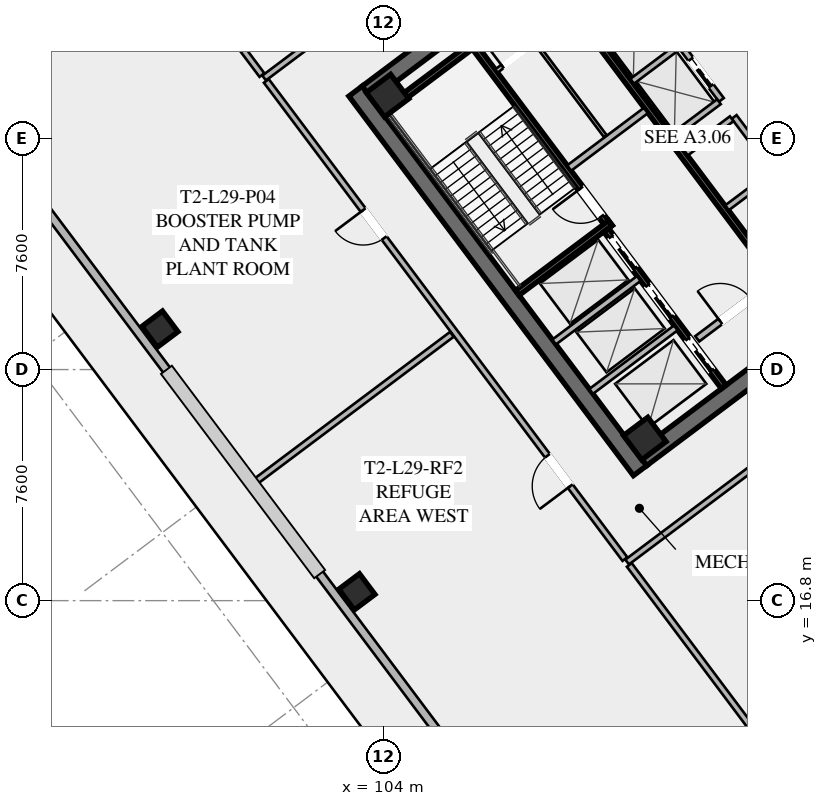
"""IFC4 building model, lengths in metres.
Left out: names, types, materials, properties, quantities, classifications, styles, units other than length and angle.
Written with IfcOpenShell. Run it as: python <this file> out.ifc"""

import sys

from ifc_helpers import new_model, si_unit, direction, frame, frame_2d, origin, origin_2d, place, context, subcontext, project, spatial, rectangle, hollow_rectangle, extrude, element, fill, save


model = new_model("IFC4")
c1 = context("Model", 3, precision=1e-05, world=origin(), true_north=direction((0.0, 1.0)))
c2 = subcontext(c1, "Body", "Model", "MODEL_VIEW")
j1 = project(units=[si_unit("LENGTHUNIT", "METRE"), si_unit("PLANEANGLEUNIT", "RADIAN")], contexts=[c1])
p1 = place(None, origin())
s1 = spatial("IfcSite", under=j1, at=p1, CompositionType="ELEMENT")
p2 = place(p1, origin())
s2 = spatial("IfcBuilding", under=s1, at=p2, CompositionType="ELEMENT")
p3 = place(p2, frame((0.0, 0.0, 109.8)))
s3 = spatial("IfcBuildingStorey", under=s2, at=p3, CompositionType="ELEMENT", Elevation=109.8)
for number, where, z_axis, x_axis in (
    (1, (112.436, 21.077, 0.0), (0.0, 0.0, 1.0), (-0.6, 0.8, 0.0)),
    (2, (115.564, 42.923, 0.0), (0.0, 0.0, 1.0), (0.6, -0.8, 0.0)),
):
    element("IfcWall", number, at=place(p3, frame(where, z_axis=z_axis, x_axis=x_axis)), inside=s3, PredefinedType="SHEAR", context=c2, shape_type="SweptSolid", body=[
        extrude(rectangle(XDim=15.6, YDim=0.55, at=frame_2d((7.8, 0.0))), origin(), (0.0, 0.0, 1.0), 4.6),
    ])
p4 = place(p3, frame((124.539, 30.498, 0.0), z_axis=(0.0, 0.0, 1.0), x_axis=(-0.799998054672, -0.600002593761, 0.0)))
e3 = element("IfcWall", 3, at=p4, inside=s3, PredefinedType="SHEAR", context=c2, shape_type="SweptSolid", body=[
    extrude(rectangle(XDim=15.06, YDim=0.55, at=frame_2d((7.53, 0.0))), origin(), (0.0, 0.0, 1.0), 4.6),
])
p5 = place(p4, frame((9.23, 0.0, 0.0)))
e4 = element("IfcOpeningElement", 4, at=p5, cuts=e3, PredefinedType="OPENING", context=c2, shape_type="SweptSolid", body=[
    extrude(rectangle(XDim=1.25, YDim=2.25, at=frame_2d((0.625, 1.125))), frame((0.0, 0.285, 0.0), z_axis=(0.0, -1.0, 0.0), x_axis=(1.0, 0.0, 0.0)), (0.0, 0.0, 1.0), 0.57),
])
p6 = place(p4, frame((4.18, 0.0, 0.0)))
e5 = element("IfcOpeningElement", 5, at=p6, cuts=e3, PredefinedType="OPENING", context=c2, shape_type="SweptSolid", body=[
    extrude(rectangle(XDim=1.25, YDim=2.25, at=frame_2d((0.625, 1.125))), frame((0.0, 0.285, 0.0), z_axis=(0.0, -1.0, 0.0), x_axis=(1.0, 0.0, 0.0)), (0.0, 0.0, 1.0), 0.57),
])
p7 = place(p3, frame((103.461, 33.502, 0.0), z_axis=(0.0, 0.0, 1.0), x_axis=(0.799998054672, 0.600002593761, 0.0)))
e6 = element("IfcWall", 6, at=p7, inside=s3, PredefinedType="SHEAR", context=c2, shape_type="SweptSolid", body=[
    extrude(rectangle(XDim=15.06, YDim=0.55, at=frame_2d((7.53, 0.0))), origin(), (0.0, 0.0, 1.0), 4.6),
])
p8 = place(p7, frame((4.58, 0.0, 0.0)))
e7 = element("IfcOpeningElement", 7, at=p8, cuts=e6, PredefinedType="OPENING", context=c2, shape_type="SweptSolid", body=[
    extrude(rectangle(XDim=1.25, YDim=2.25, at=frame_2d((0.625, 1.125))), frame((0.0, 0.285, 0.0), z_axis=(0.0, -1.0, 0.0), x_axis=(1.0, 0.0, 0.0)), (0.0, 0.0, 1.0), 0.57),
])
p9 = place(p7, frame((9.63, 0.0, 0.0)))
e8 = element("IfcOpeningElement", 8, at=p9, cuts=e6, PredefinedType="OPENING", context=c2, shape_type="SweptSolid", body=[
    extrude(rectangle(XDim=1.25, YDim=2.25, at=frame_2d((0.625, 1.125))), frame((0.0, 0.285, 0.0), z_axis=(0.0, -1.0, 0.0), x_axis=(1.0, 0.0, 0.0)), (0.0, 0.0, 1.0), 0.57),
])
for number, where, z_axis, x_axis in (
    (9, (112.59, 22.13, 0.0), (0.0, 0.0, 1.0), (0.8, 0.6, 0.0)),
    (10, (104.13, 33.41, 0.0), (0.0, 0.0, 1.0), (0.8, 0.6, 0.0)),
):
    element("IfcColumn", number, at=place(p3, frame(where, z_axis=z_axis, x_axis=x_axis)), inside=s3, PredefinedType="COLUMN", context=c2, shape_type="SweptSolid", body=[
        extrude(hollow_rectangle(XDim=1.0, YDim=1.0, WallThickness=0.04, at=origin_2d()), origin(), (0.0, 0.0, 1.0), 4.42),
    ])
for number, where, z_axis, x_axis in (
    (11, (96.64, 25.73, -0.295), (0.0, 0.0, 1.0), (0.8, 0.6, 0.0)),
    (12, (103.12, 17.09, -0.295), (0.0, 0.0, 1.0), (0.8, 0.6, 0.0)),
):
    element("IfcColumn", number, at=place(p3, frame(where, z_axis=z_axis, x_axis=x_axis)), inside=s3, PredefinedType="COLUMN", context=c2, shape_type="SweptSolid", body=[
        extrude(hollow_rectangle(XDim=0.85, YDim=0.85, WallThickness=0.035, at=origin_2d()), origin(), (0.0, 0.0, 1.0), 4.715),
    ])
for number, where, z_axis, x_axis in (
    (13, (137.672, 26.904, 0.0), (0.0, 0.0, 1.0), (-0.8, -0.6, 0.0)),
    (14, (108.904, 8.328, 0.0), (0.0, 0.0, 1.0), (-0.6, 0.8, 0.0)),
):
    element("IfcWall", number, at=place(p3, frame(where, z_axis=z_axis, x_axis=x_axis)), inside=s3, PredefinedType="SOLIDWALL", context=c2, shape_type="SweptSolid", body=[
        extrude(rectangle(XDim=31.76, YDim=0.28, at=frame_2d((15.88, 0.0))), origin(), (0.0, 0.0, 1.0), 4.42),
    ])
p10 = place(p3, frame((111.44, 29.08, 0.0), z_axis=(0.0, 0.0, 1.0), x_axis=(-0.59999029481, 0.8000072788, 0.0)))
e15 = element("IfcWall", 15, at=p10, inside=s3, PredefinedType="SHEAR", context=c2, shape_type="SweptSolid", body=[
    extrude(rectangle(XDim=8.05, YDim=0.2, at=frame_2d((4.025, 0.0))), origin(), (0.0, 0.0, 1.0), 4.42),
])
p11 = place(p10, frame((0.45, 0.0, 0.0)))
e16 = element("IfcOpeningElement", 16, at=p11, cuts=e15, PredefinedType="OPENING", context=c2, shape_type="SweptSolid", body=[
    extrude(rectangle(XDim=1.15, YDim=2.2, at=frame_2d((0.575, 1.1))), frame((0.0, 0.11, 0.0), z_axis=(0.0, -1.0, 0.0), x_axis=(1.0, 0.0, 0.0)), (0.0, 0.0, 1.0), 0.22),
])
for number, where, z_axis, x_axis in (
    (17, (108.396, 26.922, 0.0), (0.0, 0.0, 1.0), (0.8, 0.6, 0.0)),
    (18, (103.956, 32.842, 0.0), (0.0, 0.0, 1.0), (0.8, 0.6, 0.0)),
):
    element("IfcWall", number, at=place(p3, frame(where, z_axis=z_axis, x_axis=x_axis)), inside=s3, PredefinedType="SHEAR", context=c2, shape_type="SweptSolid", body=[
        extrude(rectangle(XDim=3.83, YDim=0.2, at=frame_2d((1.915, 0.0))), origin(), (0.0, 0.0, 1.0), 4.42),
    ])
p12 = place(p3, frame((117.998, 25.936, 0.0), z_axis=(0.0, 0.0, 1.0), x_axis=(-0.600002693989, 0.799997979501, 0.0)))
e19 = element("IfcWall", 19, at=p12, inside=s3, PredefinedType="SHEAR", context=c2, shape_type="SweptSolid", body=[
    extrude(rectangle(XDim=14.5, YDim=0.2, at=frame_2d((7.25, 0.0))), origin(), (0.0, 0.0, 1.0), 4.42),
])
p13 = place(p3, frame((110.104, 31.028, 0.0), z_axis=(0.0, 0.0, 1.0), x_axis=(0.800018601094, 0.59997519774, 0.0)))
e20 = element("IfcWall", 20, at=p13, inside=s3, PredefinedType="SOLIDWALL", context=c2, shape_type="SweptSolid", body=[
    extrude(rectangle(XDim=3.15, YDim=0.22, at=frame_2d((1.575, 0.0))), origin(), (0.0, 0.0, 1.0), 3.531),
])
p14 = place(p3, frame((114.316, 25.412, 0.0), z_axis=(0.0, 0.0, 1.0), x_axis=(0.800018601094, 0.59997519774, 0.0)))
e21 = element("IfcWall", 21, at=p14, inside=s3, PredefinedType="SOLIDWALL", context=c2, shape_type="SweptSolid", body=[
    extrude(rectangle(XDim=3.15, YDim=0.22, at=frame_2d((1.575, 0.0))), origin(), (0.0, 0.0, 1.0), 3.531),
])
p15 = place(p14, frame((0.95, 0.0, 0.0)))
e22 = element("IfcOpeningElement", 22, at=p15, cuts=e21, PredefinedType="OPENING", context=c2, shape_type="SweptSolid", body=[
    extrude(rectangle(XDim=1.25, YDim=2.25, at=frame_2d((0.625, 1.125))), frame((0.0, 0.12, 0.0), z_axis=(0.0, -1.0, 0.0), x_axis=(1.0, 0.0, 0.0)), (0.0, 0.0, 1.0), 0.24),
])
p16 = place(p3, frame((115.19, 23.83, 0.0), z_axis=(0.0, 0.0, 1.0), x_axis=(-0.599993943644, 0.800004542231, 0.0)))
e23 = element("IfcWall", 23, at=p16, inside=s3, PredefinedType="SHEAR", context=c2, shape_type="SweptSolid", body=[
    extrude(rectangle(XDim=6.45, YDim=0.2, at=frame_2d((3.225, 0.0))), origin(), (0.0, 0.0, 1.0), 4.42),
])
p17 = place(p16, frame((4.875, 0.0, 0.0)))
e24 = element("IfcOpeningElement", 24, at=p17, cuts=e23, PredefinedType="OPENING", context=c2, shape_type="SweptSolid", body=[
    extrude(rectangle(XDim=1.3, YDim=2.25, at=frame_2d((0.65, 1.125))), frame((0.0, 0.11, 0.0), z_axis=(0.0, -1.0, 0.0), x_axis=(1.0, 0.0, 0.0)), (0.0, 0.0, 1.0), 0.22),
])
p18 = place(p16, frame((2.875, 0.0, 0.0)))
e25 = element("IfcOpeningElement", 25, at=p18, cuts=e23, PredefinedType="OPENING", context=c2, shape_type="SweptSolid", body=[
    extrude(rectangle(XDim=1.3, YDim=2.25, at=frame_2d((0.65, 1.125))), frame((0.0, 0.11, 0.0), z_axis=(0.0, -1.0, 0.0), x_axis=(1.0, 0.0, 0.0)), (0.0, 0.0, 1.0), 0.22),
])
p19 = place(p16, frame((0.675, 0.0, 0.0)))
e26 = element("IfcOpeningElement", 26, at=p19, cuts=e23, PredefinedType="OPENING", context=c2, shape_type="SweptSolid", body=[
    extrude(rectangle(XDim=1.3, YDim=2.25, at=frame_2d((0.65, 1.125))), frame((0.0, 0.11, 0.0), z_axis=(0.0, -1.0, 0.0), x_axis=(1.0, 0.0, 0.0)), (0.0, 0.0, 1.0), 0.22),
])
for number, where, z_axis, x_axis in (
    (27, (110.826, 23.682, 0.0), (0.0, 0.0, 1.0), (0.8, 0.6, 0.0)),
    (28, (109.608, 25.306, 0.0), (0.0, 0.0, 1.0), (0.8, 0.6, 0.0)),
):
    element("IfcWall", number, at=place(p3, frame(where, z_axis=z_axis, x_axis=x_axis)), inside=s3, PredefinedType="SOLIDWALL", context=c2, shape_type="SweptSolid", body=[
        extrude(rectangle(XDim=3.48, YDim=0.2, at=frame_2d((1.74, 0.0))), origin(), (0.0, 0.0, 1.0), 4.42),
    ])
p20 = place(p3, frame((107.71, 34.22, 0.0), z_axis=(0.0, 0.0, 1.0), x_axis=(0.799981399002, 0.60002480053, 0.0)))
e29 = element("IfcWall", 29, at=p20, inside=s3, PredefinedType="PARTITIONING", context=c2, shape_type="SweptSolid", body=[
    extrude(rectangle(XDim=3.15, YDim=0.135, at=frame_2d((1.575, 0.0))), origin(), (0.0, 0.0, 1.0), 3.531),
])
p21 = place(p20, frame((0.25, 0.0, 0.0)))
e30 = element("IfcOpeningElement", 30, at=p21, cuts=e29, PredefinedType="OPENING", context=c2, shape_type="SweptSolid", body=[
    extrude(rectangle(XDim=0.95, YDim=2.05, at=frame_2d((0.475, 1.025))), frame((0.0, 0.077, 0.0), z_axis=(0.0, -1.0, 0.0), x_axis=(1.0, 0.0, 0.0)), (0.0, 0.0, 1.0), 0.155),
])
p22 = place(p20, frame((1.95, 0.0, 0.0)))
e31 = element("IfcOpeningElement", 31, at=p22, cuts=e29, PredefinedType="OPENING", context=c2, shape_type="SweptSolid", body=[
    extrude(rectangle(XDim=0.95, YDim=2.05, at=frame_2d((0.475, 1.025))), frame((0.0, 0.077, 0.0), z_axis=(0.0, -1.0, 0.0), x_axis=(1.0, 0.0, 0.0)), (0.0, 0.0, 1.0), 0.155),
])
p23 = place(p3, frame((111.296, 32.072, 0.0), z_axis=(0.0, 0.0, 1.0), x_axis=(-0.59995887973, 0.800030838552, 0.0)))
e32 = element("IfcWall", 32, at=p23, inside=s3, PredefinedType="PARTITIONING", context=c2, shape_type="SweptSolid", body=[
    extrude(rectangle(XDim=3.8, YDim=0.11, at=frame_2d((1.9, 0.0))), origin(), (0.0, 0.0, 1.0), 3.531),
])
p24 = place(p3, frame((119.67, 27.19, 0.0), z_axis=(0.0, 0.0, 1.0), x_axis=(-0.599988677396, 0.800008491828, 0.0)))
e33 = element("IfcWall", 33, at=p24, inside=s3, PredefinedType="SOLIDWALL", context=c2, shape_type="SweptSolid", body=[
    extrude(rectangle(XDim=6.9, YDim=0.2, at=frame_2d((3.45, 0.0))), origin(), (0.0, 0.0, 1.0), 4.42),
])
p25 = place(p3, frame((115.296, 29.722, 0.0), z_axis=(0.0, 0.0, 1.0), x_axis=(0.799984418148, 0.600020775241, 0.0)))
e34 = element("IfcWall", 34, at=p25, inside=s3, PredefinedType="SOLIDWALL", context=c2, shape_type="SweptSolid", body=[
    extrude(rectangle(XDim=1.88, YDim=0.2, at=frame_2d((0.94, 0.0))), origin(), (0.0, 0.0, 1.0), 4.42),
])
p26 = place(p3, frame((113.946, 31.522, 0.0), z_axis=(0.0, 0.0, 1.0), x_axis=(0.8, 0.6, 0.0)))
e35 = element("IfcWall", 35, at=p26, inside=s3, PredefinedType="SOLIDWALL", context=c2, shape_type="SweptSolid", body=[
    extrude(rectangle(XDim=1.88, YDim=0.2, at=frame_2d((0.94, 0.0))), origin(), (0.0, 0.0, 1.0), 4.42),
])
p27 = place(p3, frame((115.11, 33.27, 0.0), z_axis=(0.0, 0.0, 1.0), x_axis=(-0.600011322243, 0.799991508192, 0.0)))
e36 = element("IfcWall", 36, at=p27, inside=s3, PredefinedType="SOLIDWALL", context=c2, shape_type="SweptSolid", body=[
    extrude(rectangle(XDim=6.9, YDim=0.2, at=frame_2d((3.45, 0.0))), origin(), (0.0, 0.0, 1.0), 4.42),
])
p28 = place(p27, frame((0.575, 0.0, 0.0)))
e37 = element("IfcOpeningElement", 37, at=p28, cuts=e36, PredefinedType="OPENING", context=c2, shape_type="SweptSolid", body=[
    extrude(rectangle(XDim=1.1, YDim=2.2, at=frame_2d((0.55, 1.1))), frame((0.0, 0.11, 0.0), z_axis=(0.0, -1.0, 0.0), x_axis=(1.0, 0.0, 0.0)), (0.0, 0.0, 1.0), 0.22),
])
p29 = place(p27, frame((2.825, 0.0, 0.0)))
e38 = element("IfcOpeningElement", 38, at=p29, cuts=e36, PredefinedType="OPENING", context=c2, shape_type="SweptSolid", body=[
    extrude(rectangle(XDim=1.1, YDim=2.2, at=frame_2d((0.55, 1.1))), frame((0.0, 0.11, 0.0), z_axis=(0.0, -1.0, 0.0), x_axis=(1.0, 0.0, 0.0)), (0.0, 0.0, 1.0), 0.22),
])
p30 = place(p27, frame((5.075, 0.0, 0.0)))
e39 = element("IfcOpeningElement", 39, at=p30, cuts=e36, PredefinedType="OPENING", context=c2, shape_type="SweptSolid", body=[
    extrude(rectangle(XDim=1.1, YDim=2.2, at=frame_2d((0.55, 1.1))), frame((0.0, 0.11, 0.0), z_axis=(0.0, -1.0, 0.0), x_axis=(1.0, 0.0, 0.0)), (0.0, 0.0, 1.0), 0.22),
])
p31 = place(p3, frame((113.526, 32.082, 0.0), z_axis=(0.0, 0.0, 1.0), x_axis=(0.800046745961, 0.599937666993, 0.0)))
e40 = element("IfcWall", 40, at=p31, inside=s3, PredefinedType="SOLIDWALL", context=c2, shape_type="SweptSolid", body=[
    extrude(rectangle(XDim=1.88, YDim=0.2, at=frame_2d((0.94, 0.0))), origin(), (0.0, 0.0, 1.0), 4.42),
])
p32 = place(p3, frame((112.176, 33.882, 0.0), z_axis=(0.0, 0.0, 1.0), x_axis=(0.8, 0.6, 0.0)))
e41 = element("IfcWall", 41, at=p32, inside=s3, PredefinedType="SOLIDWALL", context=c2, shape_type="SweptSolid", body=[
    extrude(rectangle(XDim=1.88, YDim=0.2, at=frame_2d((0.94, 0.0))), origin(), (0.0, 0.0, 1.0), 4.42),
])
p33 = place(p3, frame((100.07, 33.99, 0.0), z_axis=(0.0, 0.0, 1.0), x_axis=(0.8, 0.6, 0.0)))
e42 = element("IfcWall", 42, at=p33, inside=s3, PredefinedType="SOLIDWALL", context=c2, shape_type="SweptSolid", body=[
    extrude(rectangle(XDim=19.9, YDim=0.2, at=frame_2d((9.95, 0.0))), origin(), (0.0, 0.0, 1.0), 3.531),
])
p34 = place(p33, frame((2.2, 0.0, 0.0)))
e43 = element("IfcOpeningElement", 43, at=p34, cuts=e42, PredefinedType="OPENING", context=c2, shape_type="SweptSolid", body=[
    extrude(rectangle(XDim=1.15, YDim=2.2, at=frame_2d((0.575, 1.1))), frame((0.0, 0.11, 0.0), z_axis=(0.0, -1.0, 0.0), x_axis=(1.0, 0.0, 0.0)), (0.0, 0.0, 1.0), 0.22),
])
p35 = place(p3, frame((127.93, 30.01, 0.0), z_axis=(0.0, 0.0, 1.0), x_axis=(-0.8, -0.6, 0.0)))
e44 = element("IfcWall", 44, at=p35, inside=s3, PredefinedType="SOLIDWALL", context=c2, shape_type="SweptSolid", body=[
    extrude(rectangle(XDim=19.9, YDim=0.2, at=frame_2d((9.95, 0.0))), origin(), (0.0, 0.0, 1.0), 3.531),
])
p36 = place(p35, frame((2.2, 0.0, 0.0)))
e45 = element("IfcOpeningElement", 45, at=p36, cuts=e44, PredefinedType="OPENING", context=c2, shape_type="SweptSolid", body=[
    extrude(rectangle(XDim=1.15, YDim=2.2, at=frame_2d((0.575, 1.1))), frame((0.0, 0.11, 0.0), z_axis=(0.0, -1.0, 0.0), x_axis=(1.0, 0.0, 0.0)), (0.0, 0.0, 1.0), 0.22),
])
p37 = place(p3, frame((111.938, 18.166, 0.0), z_axis=(0.0, 0.0, 1.0), x_axis=(-0.59999602618, 0.80000298035, 0.0)))
e46 = element("IfcWall", 46, at=p37, inside=s3, PredefinedType="SOLIDWALL", context=c2, shape_type="SweptSolid", body=[
    extrude(rectangle(XDim=19.66, YDim=0.2, at=frame_2d((9.83, 0.0))), origin(), (0.0, 0.0, 1.0), 3.531),
])
p38 = place(p37, frame((3.0, 0.0, 0.0)))
e47 = element("IfcOpeningElement", 47, at=p38, cuts=e46, PredefinedType="OPENING", context=c2, shape_type="SweptSolid", body=[
    extrude(rectangle(XDim=1.25, YDim=2.25, at=frame_2d((0.625, 1.125))), frame((0.0, 0.11, 0.0), z_axis=(0.0, -1.0, 0.0), x_axis=(1.0, 0.0, 0.0)), (0.0, 0.0, 1.0), 0.22),
])
p39 = place(p37, frame((13.2, 0.0, 0.0)))
e48 = element("IfcOpeningElement", 48, at=p39, cuts=e46, PredefinedType="OPENING", context=c2, shape_type="SweptSolid", body=[
    extrude(rectangle(XDim=1.15, YDim=2.2, at=frame_2d((0.575, 1.1))), frame((0.0, 0.11, 0.0), z_axis=(0.0, -1.0, 0.0), x_axis=(1.0, 0.0, 0.0)), (0.0, 0.0, 1.0), 0.22),
])
for number, where, z_axis, x_axis in (
    (49, (99.998, 34.086, 0.0), (0.0, 0.0, 1.0), (-0.6, 0.8, 0.0)),
    (50, (112.082, 17.974, 0.0), (0.0, 0.0, 1.0), (0.6, -0.8, 0.0)),
):
    element("IfcWall", number, at=place(p3, frame(where, z_axis=z_axis, x_axis=x_axis)), inside=s3, PredefinedType="SOLIDWALL", context=c2, shape_type="SweptSolid", body=[
        extrude(rectangle(XDim=8.21, YDim=0.2, at=frame_2d((4.105, 0.0))), origin(), (0.0, 0.0, 1.0), 3.531),
    ])
p40 = place(p3, frame((99.676, 20.632, 0.0), z_axis=(0.0, 0.0, 1.0), x_axis=(0.799992862991, 0.600009515894, 0.0)))
e51 = element("IfcWall", 51, at=p40, inside=s3, PredefinedType="SOLIDWALL", context=c2, shape_type="SweptSolid", body=[
    extrude(rectangle(XDim=8.21, YDim=0.2, at=frame_2d((4.105, 0.0))), origin(), (0.0, 0.0, 1.0), 3.531),
])
p41 = place(p11, origin())
e52 = element("IfcDoor", 52, at=p41, inside=s3, OperationType="SINGLE_SWING_RIGHT", PredefinedType="DOOR", context=c2, shape_type="SweptSolid", body=[
    extrude(rectangle(XDim=1.15, YDim=2.2, at=frame_2d((0.575, 1.1))), frame((0.0, 0.025, 0.0), z_axis=(0.0, -1.0, 0.0), x_axis=(1.0, 0.0, 0.0)), (0.0, 0.0, 1.0), 0.05),
])
fill(e16, e52)
p42 = place(p15, origin())
e53 = element("IfcDoor", 53, at=p42, inside=s3, OperationType="SINGLE_SWING_LEFT", PredefinedType="DOOR", context=c2, shape_type="SweptSolid", body=[
    extrude(rectangle(XDim=1.25, YDim=2.25, at=frame_2d((0.625, 1.125))), frame((0.0, 0.025, 0.0), z_axis=(0.0, -1.0, 0.0), x_axis=(1.0, 0.0, 0.0)), (0.0, 0.0, 1.0), 0.05),
])
fill(e22, e53)
p43 = place(p21, origin())
e54 = element("IfcDoor", 54, at=p43, inside=s3, OperationType="SINGLE_SWING_LEFT", PredefinedType="DOOR", context=c2, shape_type="SweptSolid", body=[
    extrude(rectangle(XDim=0.95, YDim=2.05, at=frame_2d((0.475, 1.025))), frame((0.0, 0.025, 0.0), z_axis=(0.0, -1.0, 0.0), x_axis=(1.0, 0.0, 0.0)), (0.0, 0.0, 1.0), 0.05),
])
fill(e30, e54)
p44 = place(p38, origin())
e55 = element("IfcDoor", 55, at=p44, inside=s3, OperationType="SINGLE_SWING_LEFT", PredefinedType="DOOR", context=c2, shape_type="SweptSolid", body=[
    extrude(rectangle(XDim=1.25, YDim=2.25, at=frame_2d((0.625, 1.125))), frame((0.0, 0.025, 0.0), z_axis=(0.0, -1.0, 0.0), x_axis=(1.0, 0.0, 0.0)), (0.0, 0.0, 1.0), 0.05),
])
fill(e47, e55)
p45 = place(p39, origin())
e56 = element("IfcDoor", 56, at=p45, inside=s3, OperationType="SINGLE_SWING_RIGHT", PredefinedType="DOOR", context=c2, shape_type="SweptSolid", body=[
    extrude(rectangle(XDim=1.15, YDim=2.2, at=frame_2d((0.575, 1.1))), frame((0.0, 0.025, 0.0), z_axis=(0.0, -1.0, 0.0), x_axis=(1.0, 0.0, 0.0)), (0.0, 0.0, 1.0), 0.05),
])
fill(e48, e56)
p46 = place(p17, origin())
e57 = element("IfcDoor", 57, at=p46, inside=s3, OperationType="SLIDING_TO_LEFT", PredefinedType="DOOR", context=c2, shape_type="SweptSolid", body=[
    extrude(rectangle(XDim=1.3, YDim=2.25, at=frame_2d((0.65, 1.125))), frame((0.0, 0.025, 0.0), z_axis=(0.0, -1.0, 0.0), x_axis=(1.0, 0.0, 0.0)), (0.0, 0.0, 1.0), 0.05),
])
fill(e24, e57)
p47 = place(p18, origin())
e58 = element("IfcDoor", 58, at=p47, inside=s3, OperationType="SLIDING_TO_LEFT", PredefinedType="DOOR", context=c2, shape_type="SweptSolid", body=[
    extrude(rectangle(XDim=1.3, YDim=2.25, at=frame_2d((0.65, 1.125))), frame((0.0, 0.025, 0.0), z_axis=(0.0, -1.0, 0.0), x_axis=(1.0, 0.0, 0.0)), (0.0, 0.0, 1.0), 0.05),
])
fill(e25, e58)
p48 = place(p19, origin())
e59 = element("IfcDoor", 59, at=p48, inside=s3, OperationType="SLIDING_TO_LEFT", PredefinedType="DOOR", context=c2, shape_type="SweptSolid", body=[
    extrude(rectangle(XDim=1.3, YDim=2.25, at=frame_2d((0.65, 1.125))), frame((0.0, 0.025, 0.0), z_axis=(0.0, -1.0, 0.0), x_axis=(1.0, 0.0, 0.0)), (0.0, 0.0, 1.0), 0.05),
])
fill(e26, e59)
p49 = place(p28, origin())
e60 = element("IfcDoor", 60, at=p49, inside=s3, OperationType="SLIDING_TO_LEFT", PredefinedType="DOOR", context=c2, shape_type="SweptSolid", body=[
    extrude(rectangle(XDim=1.1, YDim=2.2, at=frame_2d((0.55, 1.1))), frame((0.0, 0.025, 0.0), z_axis=(0.0, -1.0, 0.0), x_axis=(1.0, 0.0, 0.0)), (0.0, 0.0, 1.0), 0.05),
])
fill(e37, e60)
save(model, sys.argv[1])
